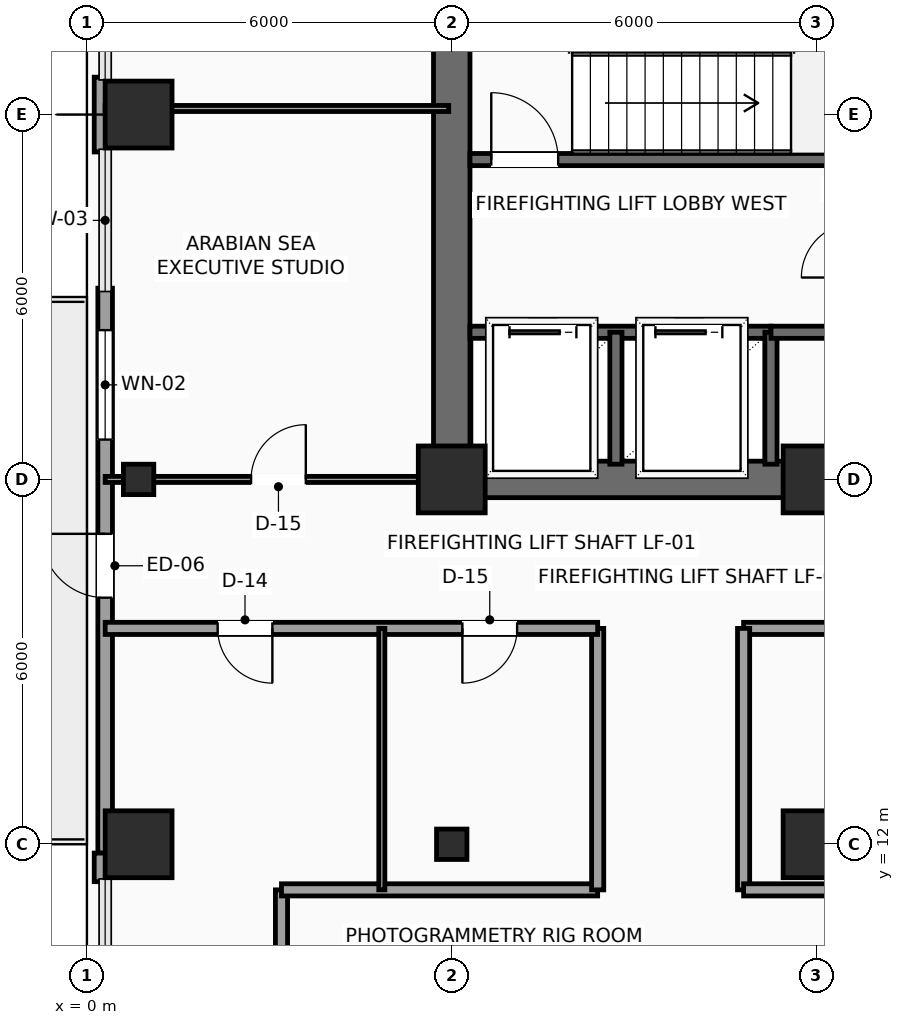
"""IFC4 building model, lengths in metres.
Left out: names, types, materials, properties, quantities, classifications, styles, units other than length and angle.
Written with IfcOpenShell. Run it as: python <this file> out.ifc"""

import sys

from ifc_helpers import new_model, si_unit, direction, frame, frame_2d, origin, origin_2d, place, context, subcontext, project, spatial, rectangle, hollow_rectangle, extrude, element, fill, save


model = new_model("IFC4")
c1 = context("Model", 3, precision=1e-05, world=origin(), true_north=direction((0.0, 1.0)))
c2 = subcontext(c1, "Body", "Model", "MODEL_VIEW")
j1 = project(units=[si_unit("LENGTHUNIT", "METRE"), si_unit("PLANEANGLEUNIT", "RADIAN")], contexts=[c1])
p1 = place(None, origin())
s1 = spatial("IfcSite", under=j1, at=p1, CompositionType="ELEMENT")
p2 = place(p1, origin())
s2 = spatial("IfcBuilding", under=s1, at=p2, CompositionType="ELEMENT")
p3 = place(p2, frame((0.0, 0.0, 145.65)))
s3 = spatial("IfcBuildingStorey", under=s2, at=p3, CompositionType="ELEMENT", Elevation=145.65)
for number, where, z_axis, x_axis in (
    (1, (6.0, 18.0, 0.0), (0.0, 0.0, 1.0), (1.0, 0.0, 0.0)),
    (2, (12.0, 18.0, 0.0), (0.0, 0.0, 1.0), (1.0, 0.0, 0.0)),
    (3, (0.85, 12.0, 0.0), (0.0, 0.0, 1.0), (1.0, 0.0, 0.0)),
):
    element("IfcColumn", number, at=place(p3, frame(where, z_axis=z_axis, x_axis=x_axis)), inside=s3, PredefinedType="COLUMN", context=c2, shape_type="SweptSolid", body=[
        extrude(rectangle(XDim=1.1, YDim=1.1, at=origin_2d()), origin(), (0.0, 0.0, 1.0), 3.75),
    ])
p4 = place(p3, frame((0.85, 18.0, 0.0), z_axis=(0.0, 0.0, 1.0), x_axis=(1.0, 0.0, 0.0)))
e4 = element("IfcColumn", 4, at=p4, inside=s3, PredefinedType="COLUMN", context=c2, shape_type="SweptSolid", body=[
    extrude(hollow_rectangle(XDim=0.5, YDim=0.5, WallThickness=0.025, InnerFilletRadius=0.025, OuterFilletRadius=0.04, at=origin_2d()), origin(), (0.0, 0.0, 1.0), 3.75),
])
p5 = place(p3, frame((0.85, 24.0, 0.0), z_axis=(0.0, 0.0, 1.0), x_axis=(1.0, 0.0, 0.0)))
e5 = element("IfcColumn", 5, at=p5, inside=s3, PredefinedType="COLUMN", context=c2, shape_type="SweptSolid", body=[
    extrude(rectangle(XDim=1.1, YDim=1.1, at=origin_2d()), origin(), (0.0, 0.0, 1.0), 3.75),
])
p6 = place(p3, frame((6.0, 12.0, 0.0), z_axis=(0.0, 0.0, 1.0), x_axis=(1.0, 0.0, 0.0)))
e6 = element("IfcColumn", 6, at=p6, inside=s3, PredefinedType="COLUMN", context=c2, shape_type="SweptSolid", body=[
    extrude(hollow_rectangle(XDim=0.5, YDim=0.5, WallThickness=0.025, InnerFilletRadius=0.025, OuterFilletRadius=0.04, at=origin_2d()), origin(), (0.0, 0.0, 1.0), 3.75),
])
p7 = place(p3, frame((12.0, 12.0, 0.0), z_axis=(0.0, 0.0, 1.0), x_axis=(1.0, 0.0, 0.0)))
e7 = element("IfcColumn", 7, at=p7, inside=s3, PredefinedType="COLUMN", context=c2, shape_type="SweptSolid", body=[
    extrude(rectangle(XDim=1.1, YDim=1.1, at=origin_2d()), origin(), (0.0, 0.0, 1.0), 3.75),
])
p8 = place(p3, frame((0.3, 11.855, 0.0), z_axis=(0.0, 0.0, 1.0), x_axis=(0.0, 1.0, 0.0)))
e8 = element("IfcWall", 8, at=p8, inside=s3, PredefinedType="SOLIDWALL", context=c2, shape_type="SweptSolid", body=[
    extrude(rectangle(XDim=9.29, YDim=0.24, at=frame_2d((4.645, 0.0))), origin(), (0.0, 0.0, 1.0), 3.525),
])
p9 = place(p8, frame((4.2, 0.0, 0.0)))
e9 = element("IfcOpeningElement", 9, at=p9, cuts=e8, PredefinedType="OPENING", context=c2, shape_type="SweptSolid", body=[
    extrude(rectangle(XDim=1.05, YDim=2.2, at=frame_2d((0.525, 1.1))), frame((0.0, 0.13, 0.0), z_axis=(0.0, -1.0, 0.0), x_axis=(1.0, 0.0, 0.0)), (0.0, 0.0, 1.0), 0.26),
])
p10 = place(p8, frame((6.8, 0.0, 0.85)))
e10 = element("IfcOpeningElement", 10, at=p10, cuts=e8, PredefinedType="OPENING", context=c2, shape_type="SweptSolid", body=[
    extrude(rectangle(XDim=1.8, YDim=2.1, at=frame_2d((0.9, 1.05))), frame((0.0, 0.13, 0.0), z_axis=(0.0, -1.0, 0.0), x_axis=(1.0, 0.0, 0.0)), (0.0, 0.0, 1.0), 0.26),
])
p11 = place(p3, frame((0.24, 11.385, 0.0), z_axis=(0.0, 0.0, 1.0), x_axis=(0.0, 1.0, 0.0)))
e11 = element("IfcWall", 11, at=p11, inside=s3, PredefinedType="SOLIDWALL", context=c2, shape_type="SweptSolid", body=[
    extrude(rectangle(XDim=0.47, YDim=0.24, at=frame_2d((0.235, 0.0))), origin(), (0.0, 0.0, 1.0), 3.525),
])
p12 = place(p3, frame((0.24, 23.385, 0.0), z_axis=(0.0, 0.0, 1.0), x_axis=(0.0, 1.0, 0.0)))
e12 = element("IfcWall", 12, at=p12, inside=s3, PredefinedType="SOLIDWALL", context=c2, shape_type="SweptSolid", body=[
    extrude(rectangle(XDim=1.23, YDim=0.24, at=frame_2d((0.615, 0.0))), origin(), (0.0, 0.0, 1.0), 3.525),
])
p13 = place(p3, frame((6.0, 18.0, 0.0), z_axis=(0.0, 0.0, 1.0), x_axis=(1.0, 0.0, 0.0)))
e13 = element("IfcWall", 13, at=p13, inside=s3, PredefinedType="SHEAR", context=c2, shape_type="SweptSolid", body=[
    extrude(rectangle(XDim=12.0, YDim=0.6, at=frame_2d((6.0, 0.0))), origin(), (0.0, 0.0, 1.0), 3.525),
])
p14 = place(p13, frame((7.15, 0.0, 0.0)))
e14 = element("IfcOpeningElement", 14, at=p14, cuts=e13, PredefinedType="OPENING", context=c2, shape_type="SweptSolid", body=[
    extrude(rectangle(XDim=1.6, YDim=2.3, at=frame_2d((0.8, 1.15))), frame((0.0, 0.31, 0.0), z_axis=(0.0, -1.0, 0.0), x_axis=(1.0, 0.0, 0.0)), (0.0, 0.0, 1.0), 0.62),
])
p15 = place(p3, frame((6.0, 18.0, 0.0), z_axis=(0.0, 0.0, 1.0), x_axis=(0.0, 1.0, 0.0)))
e15 = element("IfcWall", 15, at=p15, inside=s3, PredefinedType="SHEAR", context=c2, shape_type="SweptSolid", body=[
    extrude(rectangle(XDim=9.6, YDim=0.6, at=frame_2d((4.8, 0.0))), origin(), (0.0, 0.0, 1.0), 3.525),
])
p16 = place(p3, frame((6.3, 23.26, 0.0), z_axis=(0.0, 0.0, 1.0), x_axis=(1.0, 0.0, 0.0)))
e16 = element("IfcWall", 16, at=p16, inside=s3, PredefinedType="SHEAR", context=c2, shape_type="SweptSolid", body=[
    extrude(rectangle(XDim=8.88, YDim=0.2, at=frame_2d((4.44, 0.0))), origin(), (0.0, 0.0, 1.0), 3.525),
])
p17 = place(p16, frame((0.35, 0.0, 0.0)))
e17 = element("IfcOpeningElement", 17, at=p17, cuts=e16, PredefinedType="OPENING", context=c2, shape_type="SweptSolid", body=[
    extrude(rectangle(XDim=1.1, YDim=2.2, at=frame_2d((0.55, 1.1))), frame((0.0, 0.11, 0.0), z_axis=(0.0, -1.0, 0.0), x_axis=(1.0, 0.0, 0.0)), (0.0, 0.0, 1.0), 0.22),
])
p18 = place(p3, frame((6.3, 20.42, 0.0), z_axis=(0.0, 0.0, 1.0), x_axis=(1.0, 0.0, 0.0)))
e18 = element("IfcWall", 18, at=p18, inside=s3, PredefinedType="SHEAR", context=c2, shape_type="SweptSolid", body=[
    extrude(rectangle(XDim=4.95, YDim=0.2, at=frame_2d((2.475, 0.0))), origin(), (0.0, 0.0, 1.0), 3.525),
])
p19 = place(p18, frame((0.65, 0.0, 0.0)))
e19 = element("IfcOpeningElement", 19, at=p19, cuts=e18, PredefinedType="OPENING", context=c2, shape_type="SweptSolid", body=[
    extrude(rectangle(XDim=1.1, YDim=2.2, at=frame_2d((0.55, 1.1))), frame((0.0, 0.11, 0.0), z_axis=(0.0, -1.0, 0.0), x_axis=(1.0, 0.0, 0.0)), (0.0, 0.0, 1.0), 0.22),
])
p20 = place(p18, frame((3.05, 0.0, 0.0)))
e20 = element("IfcOpeningElement", 20, at=p20, cuts=e18, PredefinedType="OPENING", context=c2, shape_type="SweptSolid", body=[
    extrude(rectangle(XDim=1.1, YDim=2.2, at=frame_2d((0.55, 1.1))), frame((0.0, 0.11, 0.0), z_axis=(0.0, -1.0, 0.0), x_axis=(1.0, 0.0, 0.0)), (0.0, 0.0, 1.0), 0.22),
])
for number, where, z_axis, x_axis in (
    (21, (8.7, 18.25, 0.0), (0.0, 0.0, 1.0), (0.0, 1.0, 0.0)),
    (22, (11.25, 18.25, 0.0), (0.0, 0.0, 1.0), (0.0, 1.0, 0.0)),
):
    element("IfcWall", number, at=place(p3, frame(where, z_axis=z_axis, x_axis=x_axis)), inside=s3, PredefinedType="SHEAR", context=c2, shape_type="SweptSolid", body=[
        extrude(rectangle(XDim=2.17, YDim=0.2, at=frame_2d((1.085, 0.0))), origin(), (0.0, 0.0, 1.0), 3.525),
    ])
p21 = place(p3, frame((11.25, 20.42, 0.0), z_axis=(0.0, 0.0, 1.0), x_axis=(1.0, 0.0, 0.0)))
e23 = element("IfcWall", 23, at=p21, inside=s3, PredefinedType="SHEAR", context=c2, shape_type="SweptSolid", body=[
    extrude(rectangle(XDim=1.4, YDim=0.2, at=frame_2d((0.7, 0.0))), origin(), (0.0, 0.0, 1.0), 3.525),
])
p22 = place(p3, frame((3.2, 9.2, 0.0), z_axis=(0.0, 0.0, 1.0), x_axis=(0.0, 1.0, 0.0)))
e24 = element("IfcWall", 24, at=p22, inside=s3, PredefinedType="PARTITIONING", context=c2, shape_type="SweptSolid", body=[
    extrude(rectangle(XDim=2.05, YDim=0.2, at=frame_2d((1.025, 0.0))), origin(), (0.0, 0.0, 1.0), 3.525),
])
p23 = place(p3, frame((3.2, 11.25, 0.0), z_axis=(0.0, 0.0, 1.0), x_axis=(1.0, 0.0, 0.0)))
e25 = element("IfcWall", 25, at=p23, inside=s3, PredefinedType="PARTITIONING", context=c2, shape_type="SweptSolid", body=[
    extrude(rectangle(XDim=5.2, YDim=0.2, at=frame_2d((2.6, 0.0))), origin(), (0.0, 0.0, 1.0), 3.525),
])
p24 = place(p3, frame((8.4, 11.25, 0.0), z_axis=(0.0, 0.0, 1.0), x_axis=(0.0, 1.0, 0.0)))
e26 = element("IfcWall", 26, at=p24, inside=s3, PredefinedType="PARTITIONING", context=c2, shape_type="SweptSolid", body=[
    extrude(rectangle(XDim=4.3, YDim=0.2, at=frame_2d((2.15, 0.0))), origin(), (0.0, 0.0, 1.0), 3.525),
])
p25 = place(p3, frame((8.4, 15.55, 0.0), z_axis=(0.0, 0.0, 1.0), x_axis=(-1.0, 0.0, 0.0)))
e27 = element("IfcWall", 27, at=p25, inside=s3, PredefinedType="PARTITIONING", context=c2, shape_type="SweptSolid", body=[
    extrude(rectangle(XDim=8.1, YDim=0.2, at=frame_2d((4.05, 0.0))), origin(), (0.0, 0.0, 1.0), 3.525),
])
p26 = place(p25, frame((5.35, 0.0, 0.0)))
e28 = element("IfcOpeningElement", 28, at=p26, cuts=e27, PredefinedType="OPENING", context=c2, shape_type="SweptSolid", body=[
    extrude(rectangle(XDim=0.9, YDim=2.1, at=frame_2d((0.45, 1.05))), frame((0.0, 0.11, 0.0), z_axis=(0.0, -1.0, 0.0), x_axis=(1.0, 0.0, 0.0)), (0.0, 0.0, 1.0), 0.22),
])
p27 = place(p25, frame((1.325, 0.0, 0.0)))
e29 = element("IfcOpeningElement", 29, at=p27, cuts=e27, PredefinedType="OPENING", context=c2, shape_type="SweptSolid", body=[
    extrude(rectangle(XDim=0.9, YDim=2.1, at=frame_2d((0.45, 1.05))), frame((0.0, 0.11, 0.0), z_axis=(0.0, -1.0, 0.0), x_axis=(1.0, 0.0, 0.0)), (0.0, 0.0, 1.0), 0.22),
])
p28 = place(p3, frame((15.2, 15.55, 0.0), z_axis=(0.0, 0.0, 1.0), x_axis=(-1.0, 0.0, 0.0)))
e30 = element("IfcWall", 30, at=p28, inside=s3, PredefinedType="PARTITIONING", context=c2, shape_type="SweptSolid", body=[
    extrude(rectangle(XDim=4.4, YDim=0.2, at=frame_2d((2.2, 0.0))), origin(), (0.0, 0.0, 1.0), 3.525),
])
p29 = place(p3, frame((10.8, 15.55, 0.0), z_axis=(0.0, 0.0, 1.0), x_axis=(0.0, -1.0, 0.0)))
e31 = element("IfcWall", 31, at=p29, inside=s3, PredefinedType="PARTITIONING", context=c2, shape_type="SweptSolid", body=[
    extrude(rectangle(XDim=4.3, YDim=0.2, at=frame_2d((2.15, 0.0))), origin(), (0.0, 0.0, 1.0), 3.525),
])
p30 = place(p3, frame((10.8, 11.25, 0.0), z_axis=(0.0, 0.0, 1.0), x_axis=(1.0, 0.0, 0.0)))
e32 = element("IfcWall", 32, at=p30, inside=s3, PredefinedType="PARTITIONING", context=c2, shape_type="SweptSolid", body=[
    extrude(rectangle(XDim=10.55, YDim=0.2, at=frame_2d((5.275, 0.0))), origin(), (0.0, 0.0, 1.0), 3.525),
])
p31 = place(p30, frame((2.2, 0.0, 0.0)))
e33 = element("IfcOpeningElement", 33, at=p31, cuts=e32, PredefinedType="OPENING", context=c2, shape_type="SweptSolid", body=[
    extrude(rectangle(XDim=0.9, YDim=2.1, at=frame_2d((0.45, 1.05))), frame((0.0, 0.11, 0.0), z_axis=(0.0, -1.0, 0.0), x_axis=(1.0, 0.0, 0.0)), (0.0, 0.0, 1.0), 0.22),
])
p32 = place(p30, frame((7.68, 0.0, 0.0)))
e34 = element("IfcOpeningElement", 34, at=p32, cuts=e32, PredefinedType="OPENING", context=c2, shape_type="SweptSolid", body=[
    extrude(rectangle(XDim=0.9, YDim=2.1, at=frame_2d((0.45, 1.05))), frame((0.0, 0.11, 0.0), z_axis=(0.0, -1.0, 0.0), x_axis=(1.0, 0.0, 0.0)), (0.0, 0.0, 1.0), 0.22),
])
p33 = place(p3, frame((0.3, 18.0, 0.0), z_axis=(0.0, 0.0, 1.0), x_axis=(1.0, 0.0, 0.0)))
e35 = element("IfcWall", 35, at=p33, inside=s3, PredefinedType="PARTITIONING", context=c2, shape_type="SweptSolid", body=[
    extrude(rectangle(XDim=5.65, YDim=0.1, at=frame_2d((2.825, 0.0))), origin(), (0.0, 0.0, 1.0), 3.017),
])
p34 = place(p33, frame((2.4, 0.0, 0.0)))
e36 = element("IfcOpeningElement", 36, at=p34, cuts=e35, PredefinedType="OPENING", context=c2, shape_type="SweptSolid", body=[
    extrude(rectangle(XDim=0.9, YDim=2.1, at=frame_2d((0.45, 1.05))), frame((0.0, 0.06, 0.0), z_axis=(0.0, -1.0, 0.0), x_axis=(1.0, 0.0, 0.0)), (0.0, 0.0, 1.0), 0.12),
])
p35 = place(p3, frame((0.3, 24.1, 0.0), z_axis=(0.0, 0.0, 1.0), x_axis=(1.0, 0.0, 0.0)))
e37 = element("IfcWall", 37, at=p35, inside=s3, PredefinedType="PARTITIONING", context=c2, shape_type="SweptSolid", body=[
    extrude(rectangle(XDim=5.65, YDim=0.1, at=frame_2d((2.825, 0.0))), origin(), (0.0, 0.0, 1.0), 3.525),
])
p36 = place(p3, frame((4.85, 11.25, 0.0), z_axis=(0.0, 0.0, 1.0), x_axis=(0.0, 1.0, 0.0)))
e38 = element("IfcWall", 38, at=p36, inside=s3, PredefinedType="PARTITIONING", context=c2, shape_type="SweptSolid", body=[
    extrude(rectangle(XDim=4.3, YDim=0.1, at=frame_2d((2.15, 0.0))), origin(), (0.0, 0.0, 1.0), 3.525),
])
p37 = place(p9, origin())
e39 = element("IfcDoor", 39, at=p37, inside=s3, OperationType="SINGLE_SWING_RIGHT", PredefinedType="DOOR", context=c2, shape_type="SweptSolid", body=[
    extrude(rectangle(XDim=1.05, YDim=2.2, at=frame_2d((0.525, 1.1))), frame((0.0, 0.025, 0.0), z_axis=(0.0, -1.0, 0.0), x_axis=(1.0, 0.0, 0.0)), (0.0, 0.0, 1.0), 0.05),
])
fill(e9, e39)
p38 = place(p10, origin())
e40 = element("IfcWindow", 40, at=p38, inside=s3, PartitioningType="SINGLE_PANEL", PredefinedType="WINDOW", context=c2, shape_type="SweptSolid", body=[
    extrude(rectangle(XDim=1.8, YDim=2.1, at=frame_2d((0.9, 1.05))), frame((0.0, 0.03, 0.0), z_axis=(0.0, -1.0, 0.0), x_axis=(1.0, 0.0, 0.0)), (0.0, 0.0, 1.0), 0.06),
])
fill(e10, e40)
p39 = place(p17, origin())
e41 = element("IfcDoor", 41, at=p39, inside=s3, OperationType="SINGLE_SWING_LEFT", PredefinedType="DOOR", context=c2, shape_type="SweptSolid", body=[
    extrude(rectangle(XDim=1.1, YDim=2.2, at=frame_2d((0.55, 1.1))), frame((0.0, 0.025, 0.0), z_axis=(0.0, -1.0, 0.0), x_axis=(1.0, 0.0, 0.0)), (0.0, 0.0, 1.0), 0.05),
])
fill(e17, e41)
p40 = place(p19, origin())
e42 = element("IfcDoor", 42, at=p40, inside=s3, OperationType="SLIDING_TO_LEFT", PredefinedType="DOOR", context=c2, shape_type="SweptSolid", body=[
    extrude(rectangle(XDim=1.1, YDim=2.2, at=frame_2d((0.55, 1.1))), frame((0.0, 0.025, 0.0), z_axis=(0.0, -1.0, 0.0), x_axis=(1.0, 0.0, 0.0)), (0.0, 0.0, 1.0), 0.05),
])
fill(e19, e42)
p41 = place(p20, origin())
e43 = element("IfcDoor", 43, at=p41, inside=s3, OperationType="SLIDING_TO_LEFT", PredefinedType="DOOR", context=c2, shape_type="SweptSolid", body=[
    extrude(rectangle(XDim=1.1, YDim=2.2, at=frame_2d((0.55, 1.1))), frame((0.0, 0.025, 0.0), z_axis=(0.0, -1.0, 0.0), x_axis=(1.0, 0.0, 0.0)), (0.0, 0.0, 1.0), 0.05),
])
fill(e20, e43)
p42 = place(p26, origin())
e44 = element("IfcDoor", 44, at=p42, inside=s3, OperationType="SINGLE_SWING_LEFT", PredefinedType="DOOR", context=c2, shape_type="SweptSolid", body=[
    extrude(rectangle(XDim=0.9, YDim=2.1, at=frame_2d((0.45, 1.05))), frame((0.0, 0.025, 0.0), z_axis=(0.0, -1.0, 0.0), x_axis=(1.0, 0.0, 0.0)), (0.0, 0.0, 1.0), 0.05),
])
fill(e28, e44)
p43 = place(p27, origin())
e45 = element("IfcDoor", 45, at=p43, inside=s3, OperationType="SINGLE_SWING_RIGHT", PredefinedType="DOOR", context=c2, shape_type="SweptSolid", body=[
    extrude(rectangle(XDim=0.9, YDim=2.1, at=frame_2d((0.45, 1.05))), frame((0.0, 0.025, 0.0), z_axis=(0.0, -1.0, 0.0), x_axis=(1.0, 0.0, 0.0)), (0.0, 0.0, 1.0), 0.05),
])
fill(e29, e45)
p44 = place(p34, origin())
e46 = element("IfcDoor", 46, at=p44, inside=s3, OperationType="SINGLE_SWING_RIGHT", PredefinedType="DOOR", context=c2, shape_type="SweptSolid", body=[
    extrude(rectangle(XDim=0.9, YDim=2.1, at=frame_2d((0.45, 1.05))), frame((0.0, 0.025, 0.0), z_axis=(0.0, -1.0, 0.0), x_axis=(1.0, 0.0, 0.0)), (0.0, 0.0, 1.0), 0.05),
])
fill(e36, e46)
save(model, sys.argv[1])
